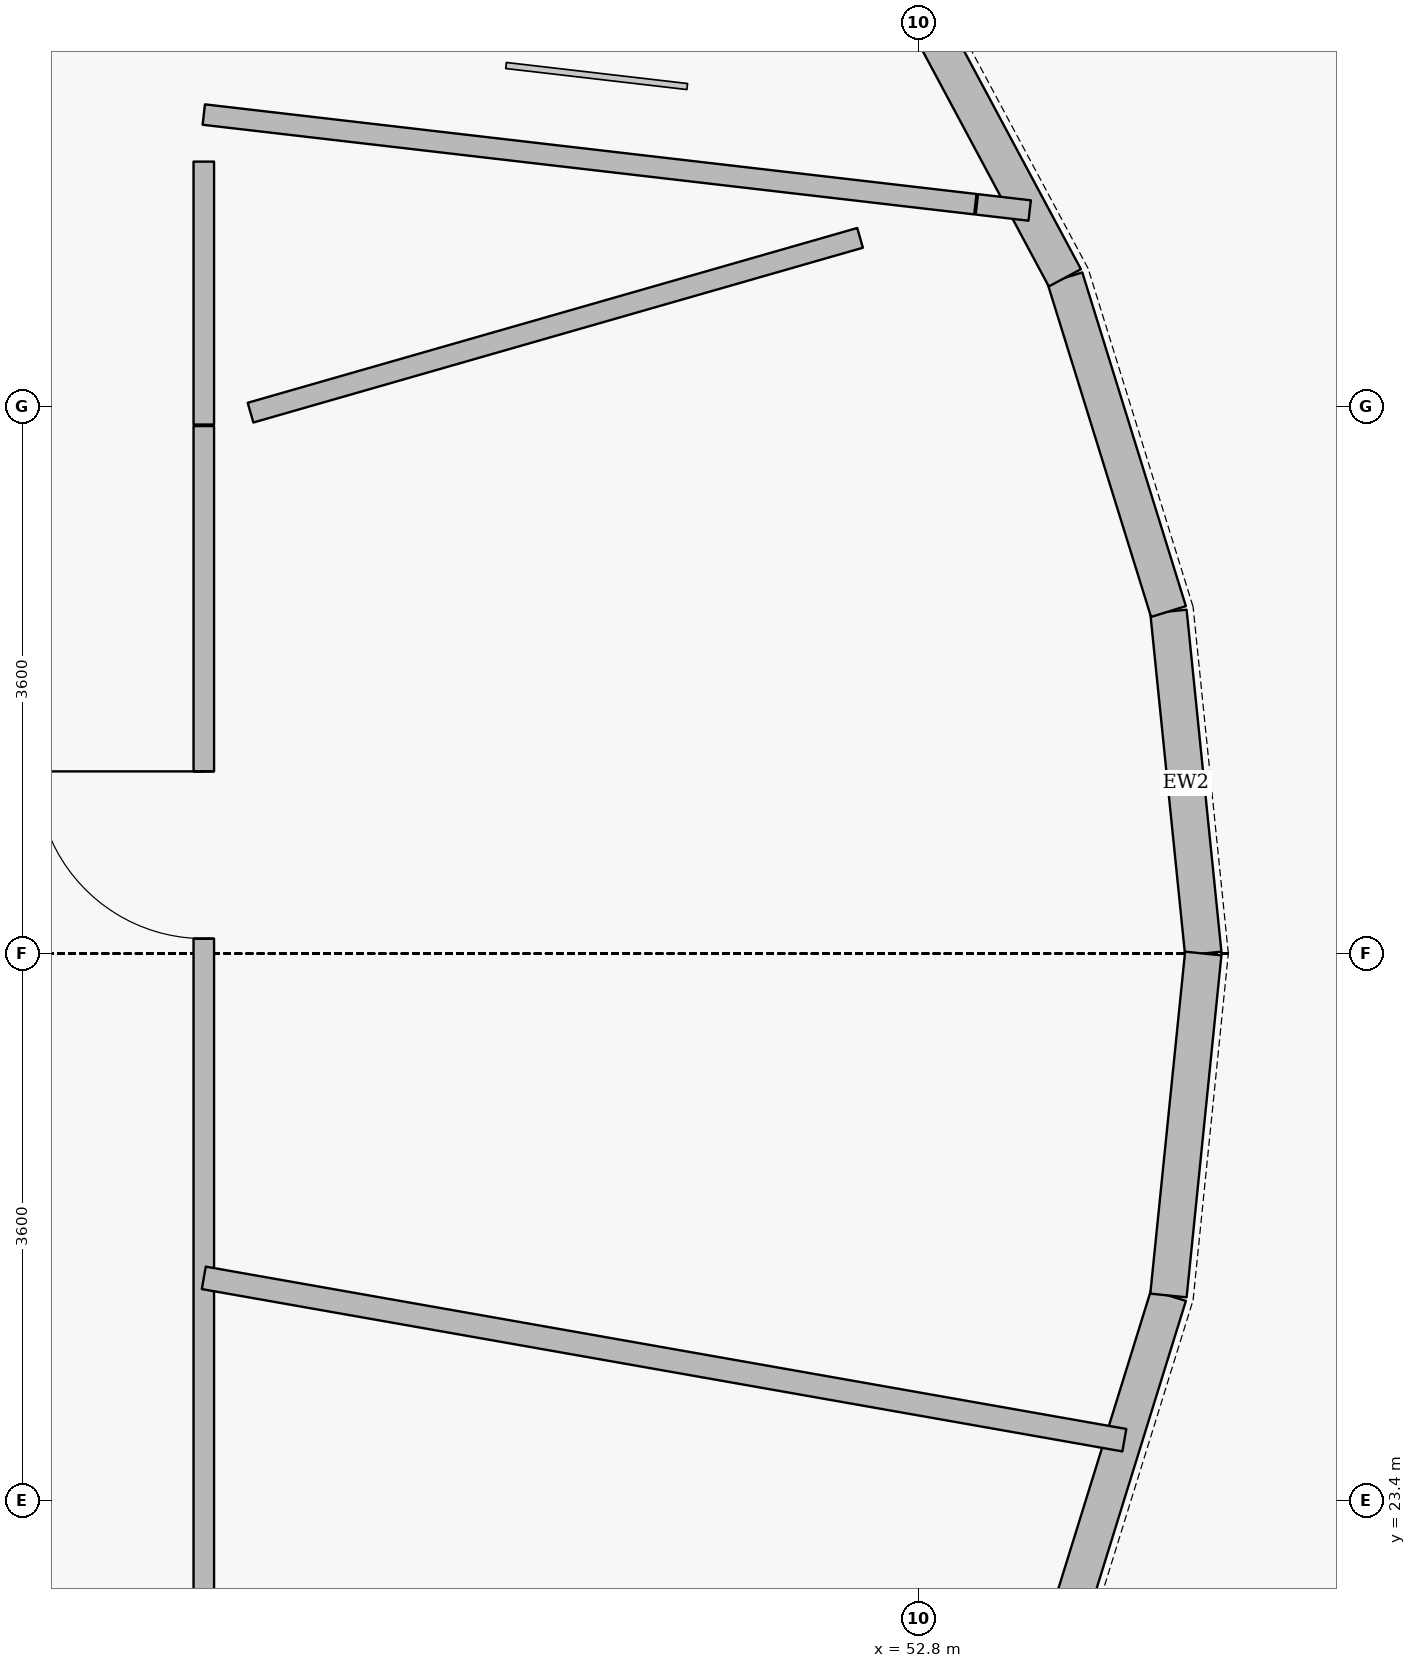
"""IFC4 building model, lengths in metres.
Left out: names, types, materials, properties, quantities, classifications, styles, units other than length and angle.
Written with IfcOpenShell. Run it as: python <this file> out.ifc"""

import sys

from ifc_helpers import new_model, si_unit, direction, frame, frame_2d, origin, origin_2d, place, context, subcontext, project, spatial, rectangle, extrude, source, transform, mapped, element, fill, save


model = new_model("IFC4")
c1 = context("Model", 3, precision=1e-05, world=origin(), true_north=direction((0.0, 1.0)))
c2 = subcontext(c1, "Body", "Model", "MODEL_VIEW")
j1 = project(units=[si_unit("LENGTHUNIT", "METRE"), si_unit("PLANEANGLEUNIT", "RADIAN")], contexts=[c1])
p1 = place(None, origin())
s1 = spatial("IfcSite", under=j1, at=p1, CompositionType="ELEMENT")
p2 = place(p1, origin())
s2 = spatial("IfcBuilding", under=s1, at=p2, CompositionType="ELEMENT")
p3 = place(p2, frame((0.0, 0.0, 318.0)))
s3 = spatial("IfcBuildingStorey", under=s2, at=p3, CompositionType="ELEMENT", Elevation=318.0)
p4 = place(p3, frame((54.446, 29.25, 0.0), z_axis=(0.0, 0.0, 1.0), x_axis=(0.101278157468, -0.994858148089, 0.0)))
e1 = element("IfcWall", 1, at=p4, inside=s3, PredefinedType="SOLIDWALL", context=c2, shape_type="SweptSolid", body=[
    extrude(rectangle(XDim=2.261, YDim=0.24, at=frame_2d((1.131, 0.0))), origin(), (0.0, 0.0, 1.0), 4.235),
])
p5 = place(p3, frame((53.765, 31.445, 0.0), z_axis=(0.0, 0.0, 1.0), x_axis=(0.296466035026, -0.95504339696, 0.0)))
e2 = element("IfcWall", 2, at=p5, inside=s3, PredefinedType="SOLIDWALL", context=c2, shape_type="SweptSolid", body=[
    extrude(rectangle(XDim=2.298, YDim=0.24, at=frame_2d((1.149, 0.0))), origin(), (0.0, 0.0, 1.0), 4.235),
])
p6 = place(p3, frame((52.646, 33.532, 0.0), z_axis=(0.0, 0.0, 1.0), x_axis=(0.472149891985, -0.881518280865, 0.0)))
e3 = element("IfcWall", 3, at=p6, inside=s3, PredefinedType="SOLIDWALL", context=c2, shape_type="SweptSolid", body=[
    extrude(rectangle(XDim=2.368, YDim=0.24, at=frame_2d((1.184, 0.0))), origin(), (0.0, 0.0, 1.0), 2.832),
])
p7 = place(p3, frame((54.446, 24.75, 0.0), z_axis=(0.0, 0.0, 1.0), x_axis=(-0.296466035026, -0.95504339696, 0.0)))
e4 = element("IfcWall", 4, at=p7, inside=s3, PredefinedType="SOLIDWALL", context=c2, shape_type="SweptSolid", body=[
    extrude(rectangle(XDim=2.298, YDim=0.24, at=frame_2d((1.149, 0.0))), origin(), (0.0, 0.0, 1.0), 5.75),
])
p8 = place(p3, frame((54.675, 27.0, 0.0), z_axis=(0.0, 0.0, 1.0), x_axis=(-0.101278157468, -0.994858148089, 0.0)))
e5 = element("IfcWall", 5, at=p8, inside=s3, PredefinedType="SOLIDWALL", context=c2, shape_type="SweptSolid", body=[
    extrude(rectangle(XDim=2.261, YDim=0.24, at=frame_2d((1.131, 0.0))), origin(), (0.0, 0.0, 1.0), 4.235),
])
p9 = place(p3, frame((48.1, 19.439, 0.0), z_axis=(0.0, 0.0, 1.0), x_axis=(0.0, 1.0, 0.0)))
e6 = element("IfcWall", 6, at=p9, inside=s3, PredefinedType="PARTITIONING", context=c2, shape_type="SweptSolid", body=[
    extrude(rectangle(XDim=11.031, YDim=0.135, at=frame_2d((5.515, 0.0))), origin(), (0.0, 0.0, 1.0), 4.235),
])
p10 = place(p9, frame((2.184, 0.0, 0.0)))
e7 = element("IfcOpeningElement", 7, at=p10, cuts=e6, PredefinedType="OPENING", context=c2, shape_type="SweptSolid", body=[
    extrude(rectangle(XDim=1.1, YDim=2.15, at=origin_2d()), frame((0.55, 0.078, 1.075), z_axis=(0.0, -1.0, 0.0), x_axis=(1.0, 0.0, 0.0)), (0.0, 0.0, 1.0), 0.155),
])
p11 = place(p9, frame((7.659, 0.0, 0.0)))
e8 = element("IfcOpeningElement", 8, at=p11, cuts=e6, PredefinedType="OPENING", context=c2, shape_type="SweptSolid", body=[
    extrude(rectangle(XDim=1.1, YDim=2.15, at=origin_2d()), frame((0.55, 0.078, 1.075), z_axis=(0.0, -1.0, 0.0), x_axis=(1.0, 0.0, 0.0)), (0.0, 0.0, 1.0), 0.155),
])
p12 = place(p3, frame((48.1, 24.866, 0.0), z_axis=(0.0, 0.0, 1.0), x_axis=(0.984805134994, -0.173663024531, 0.0)))
e9 = element("IfcWall", 9, at=p12, inside=s3, PredefinedType="PARTITIONING", context=c2, shape_type="SweptSolid", body=[
    extrude(rectangle(XDim=6.149, YDim=0.15, at=frame_2d((3.075, 0.0))), origin(), (0.0, 0.0, 1.0), 5.75),
])
p13 = place(p3, frame((53.186, 31.928, 0.0), z_axis=(0.0, 0.0, 1.0), x_axis=(0.993273839517, -0.115788944775, 0.0)))
e10 = element("IfcWall", 10, at=p13, inside=s3, PredefinedType="PARTITIONING", context=c2, shape_type="SweptSolid", body=[
    extrude(rectangle(XDim=0.35, YDim=0.135, at=frame_2d((0.175, 0.0))), origin(), (0.0, 0.0, 1.0), 5.75),
])
p14 = place(p3, frame((53.176, 31.929, 0.0), z_axis=(0.0, 0.0, 1.0), x_axis=(-0.993315281572, 0.115432886978, 0.0)))
e11 = element("IfcWall", 11, at=p14, inside=s3, PredefinedType="PARTITIONING", context=c2, shape_type="SweptSolid", body=[
    extrude(rectangle(XDim=5.11, YDim=0.135, at=frame_2d((2.555, 0.0))), origin(), (0.0, 0.0, 1.0), 5.75),
])
p15 = place(p3, frame((48.1, 32.209, 0.0), z_axis=(0.0, 0.0, 1.0), x_axis=(0.0, -1.0, 0.0)))
e12 = element("IfcWall", 12, at=p15, inside=s3, PredefinedType="PARTITIONING", context=c2, shape_type="SweptSolid", body=[
    extrude(rectangle(XDim=1.729, YDim=0.135, at=frame_2d((0.865, 0.0))), origin(), (0.0, 0.0, 1.0), 5.75),
])
p16 = place(p3, frame((48.407, 30.558, 0.0), z_axis=(0.0, 0.0, 1.0), x_axis=(0.961269545764, 0.275609978751, 0.0)))
e13 = element("IfcWall", 13, at=p16, inside=s3, PredefinedType="PARTITIONING", context=c2, shape_type="SweptSolid", body=[
    extrude(rectangle(XDim=4.171, YDim=0.135, at=frame_2d((2.086, 0.0))), origin(), (0.0, 0.0, 1.0), 5.75),
])
m1 = source(origin(), c2, "Body", "SweptSolid", [
    extrude(rectangle(XDim=1.1, YDim=2.15, at=origin_2d()), frame((0.55, 0.025, 1.075), z_axis=(0.0, -1.0, 0.0), x_axis=(1.0, 0.0, 0.0)), (0.0, 0.0, 1.0), 0.05),
])
p17 = place(p11, origin())
e14 = element("IfcDoor", 14, at=p17, inside=s3, OperationType="SINGLE_SWING_RIGHT", PredefinedType="DOOR", context=c2, shape_type="MappedRepresentation", body=[
    mapped(m1, transform((0.0, 0.0, 0.0), x_axis=(1.0, 0.0, 0.0), y_axis=(0.0, 1.0, 0.0), z_axis=(0.0, 0.0, 1.0), scale=1.0)),
])
fill(e8, e14)
save(model, sys.argv[1])
